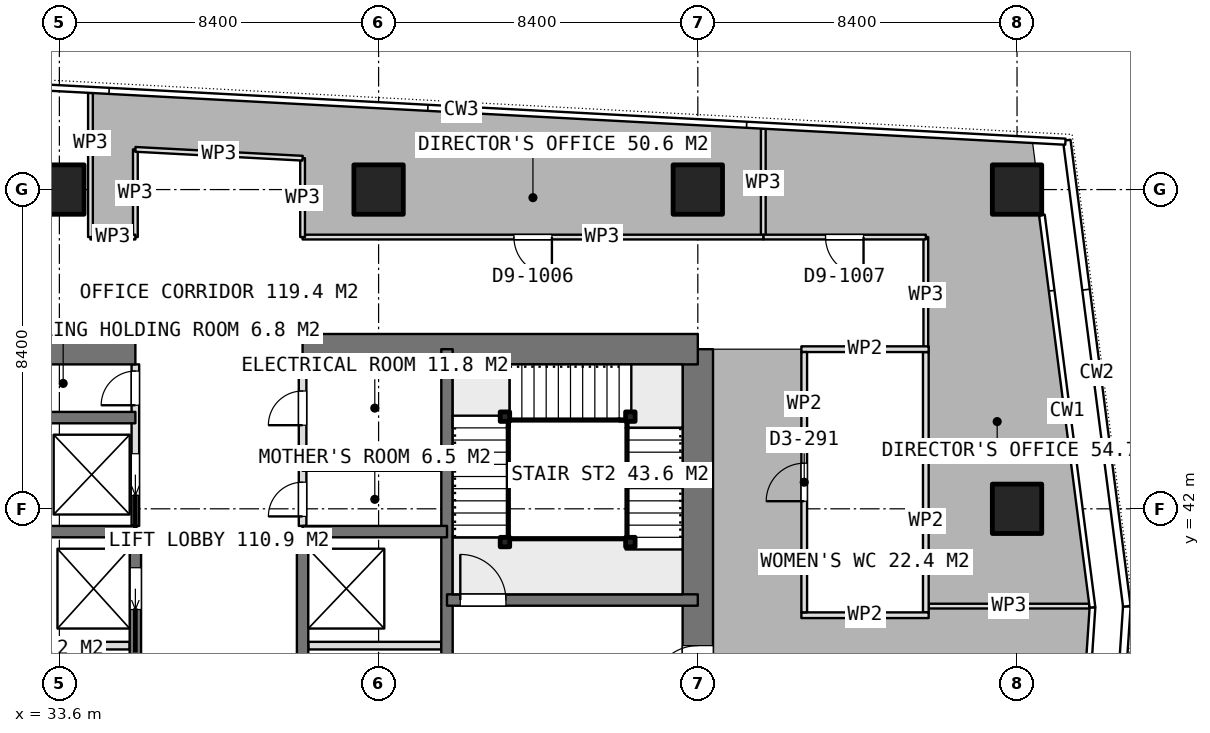
"""IFC4 building model, lengths in metres.
Left out: names, types, materials, properties, quantities, classifications, styles, units other than length and angle.
Written with IfcOpenShell. Run it as: python <this file> out.ifc"""

import sys

from ifc_helpers import new_model, si_unit, direction, frame, frame_2d, origin, origin_2d, place, context, subcontext, project, spatial, rectangle, extrude, element, fill, save


model = new_model("IFC4")
c1 = context("Model", 3, precision=1e-05, world=origin(), true_north=direction((0.0, 1.0)))
c2 = subcontext(c1, "Body", "Model", "MODEL_VIEW")
j1 = project(units=[si_unit("LENGTHUNIT", "METRE"), si_unit("PLANEANGLEUNIT", "RADIAN")], contexts=[c1])
p1 = place(None, origin())
s1 = spatial("IfcSite", under=j1, at=p1, CompositionType="ELEMENT")
p2 = place(p1, origin())
s2 = spatial("IfcBuilding", under=s1, at=p2, CompositionType="ELEMENT")
p3 = place(p2, frame((0.0, 0.0, 268.85)))
s3 = spatial("IfcBuildingStorey", under=s2, at=p3, CompositionType="ELEMENT", Elevation=268.85)
p4 = place(p3, frame((25.2, 46.2, 0.0), z_axis=(0.0, 0.0, 1.0), x_axis=(1.0, 0.0, 0.0)))
e1 = element("IfcWall", 1, at=p4, inside=s3, PredefinedType="SHEAR", context=c2, shape_type="SweptSolid", body=[
    extrude(rectangle(XDim=10.4, YDim=0.8, at=frame_2d((5.2, 0.0))), origin(), (0.0, 0.0, 1.0), 3.75),
])
p5 = place(p3, frame((40.0, 46.2, 0.0), z_axis=(0.0, 0.0, 1.0), x_axis=(1.0, 0.0, 0.0)))
e2 = element("IfcWall", 2, at=p5, inside=s3, PredefinedType="SHEAR", context=c2, shape_type="SweptSolid", body=[
    extrude(rectangle(XDim=10.4, YDim=0.8, at=frame_2d((5.2, 0.0))), origin(), (0.0, 0.0, 1.0), 3.75),
])
p6 = place(p3, frame((50.4, 21.0, 0.0), z_axis=(0.0, 0.0, 1.0), x_axis=(0.0, 1.0, 0.0)))
e3 = element("IfcWall", 3, at=p6, inside=s3, PredefinedType="SHEAR", context=c2, shape_type="SweptSolid", body=[
    extrude(rectangle(XDim=25.2, YDim=0.8, at=frame_2d((12.6, 0.0))), origin(), (0.0, 0.0, 1.0), 3.75),
])
p7 = place(p6, frame((16.2, 0.0, 0.0)))
e4 = element("IfcOpeningElement", 4, at=p7, cuts=e3, PredefinedType="OPENING", context=c2, shape_type="SweptSolid", body=[
    extrude(rectangle(XDim=1.2, YDim=2.1, at=frame_2d((0.6, 1.05))), frame((0.0, 0.41, 0.0), z_axis=(0.0, -1.0, 0.0), x_axis=(1.0, 0.0, 0.0)), (0.0, 0.0, 1.0), 0.82),
])
p8 = place(p6, frame((10.05, 0.0, 0.0)))
e5 = element("IfcOpeningElement", 5, at=p8, cuts=e3, PredefinedType="OPENING", context=c2, shape_type="SweptSolid", body=[
    extrude(rectangle(XDim=0.9, YDim=2.1, at=frame_2d((0.45, 1.05))), frame((0.0, 0.41, 0.0), z_axis=(0.0, -1.0, 0.0), x_axis=(1.0, 0.0, 0.0)), (0.0, 0.0, 1.0), 0.82),
])
p9 = place(p6, frame((7.45, 0.0, 0.0)))
e6 = element("IfcOpeningElement", 6, at=p9, cuts=e3, PredefinedType="OPENING", context=c2, shape_type="SweptSolid", body=[
    extrude(rectangle(XDim=0.9, YDim=2.1, at=frame_2d((0.45, 1.05))), frame((0.0, 0.41, 0.0), z_axis=(0.0, -1.0, 0.0), x_axis=(1.0, 0.0, 0.0)), (0.0, 0.0, 1.0), 0.82),
])
p10 = place(p6, frame((0.6, 0.0, 0.0)))
e7 = element("IfcOpeningElement", 7, at=p10, cuts=e3, PredefinedType="OPENING", context=c2, shape_type="SweptSolid", body=[
    extrude(rectangle(XDim=1.2, YDim=2.1, at=frame_2d((0.6, 1.05))), frame((0.0, 0.41, 0.0), z_axis=(0.0, -1.0, 0.0), x_axis=(1.0, 0.0, 0.0)), (0.0, 0.0, 1.0), 0.82),
])
p11 = place(p3, frame((43.8, 21.0, 0.0), z_axis=(0.0, 0.0, 1.0), x_axis=(0.0, 1.0, 0.0)))
e8 = element("IfcWall", 8, at=p11, inside=s3, PredefinedType="SHEAR", context=c2, shape_type="SweptSolid", body=[
    extrude(rectangle(XDim=25.2, YDim=0.3, at=frame_2d((12.6, 0.0))), origin(), (0.0, 0.0, 1.0), 3.75),
])
p12 = place(p3, frame((35.6, 23.4, 0.0), z_axis=(0.0, 0.0, 1.0), x_axis=(0.0, 1.0, 0.0)))
e9 = element("IfcWall", 9, at=p12, inside=s3, PredefinedType="SHEAR", context=c2, shape_type="SweptSolid", body=[
    extrude(rectangle(XDim=18.0, YDim=0.3, at=frame_2d((9.0, 0.0))), origin(), (0.0, 0.0, 1.0), 3.75),
])
p13 = place(p12, frame((0.95, 0.0, 0.0)))
e10 = element("IfcOpeningElement", 10, at=p13, cuts=e9, PredefinedType="OPENING", context=c2, shape_type="SweptSolid", body=[
    extrude(rectangle(XDim=1.1, YDim=2.1, at=frame_2d((0.55, 1.05))), frame((0.0, 0.16, 0.0), z_axis=(0.0, -1.0, 0.0), x_axis=(1.0, 0.0, 0.0)), (0.0, 0.0, 1.0), 0.32),
])
p14 = place(p12, frame((3.95, 0.0, 0.0)))
e11 = element("IfcOpeningElement", 11, at=p14, cuts=e9, PredefinedType="OPENING", context=c2, shape_type="SweptSolid", body=[
    extrude(rectangle(XDim=1.1, YDim=2.1, at=frame_2d((0.55, 1.05))), frame((0.0, 0.16, 0.0), z_axis=(0.0, -1.0, 0.0), x_axis=(1.0, 0.0, 0.0)), (0.0, 0.0, 1.0), 0.32),
])
p15 = place(p12, frame((6.95, 0.0, 0.0)))
e12 = element("IfcOpeningElement", 12, at=p15, cuts=e9, PredefinedType="OPENING", context=c2, shape_type="SweptSolid", body=[
    extrude(rectangle(XDim=1.1, YDim=2.1, at=frame_2d((0.55, 1.05))), frame((0.0, 0.16, 0.0), z_axis=(0.0, -1.0, 0.0), x_axis=(1.0, 0.0, 0.0)), (0.0, 0.0, 1.0), 0.32),
])
p16 = place(p12, frame((9.95, 0.0, 0.0)))
e13 = element("IfcOpeningElement", 13, at=p16, cuts=e9, PredefinedType="OPENING", context=c2, shape_type="SweptSolid", body=[
    extrude(rectangle(XDim=1.1, YDim=2.1, at=frame_2d((0.55, 1.05))), frame((0.0, 0.16, 0.0), z_axis=(0.0, -1.0, 0.0), x_axis=(1.0, 0.0, 0.0)), (0.0, 0.0, 1.0), 0.32),
])
p17 = place(p12, frame((12.95, 0.0, 0.0)))
e14 = element("IfcOpeningElement", 14, at=p17, cuts=e9, PredefinedType="OPENING", context=c2, shape_type="SweptSolid", body=[
    extrude(rectangle(XDim=1.1, YDim=2.1, at=frame_2d((0.55, 1.05))), frame((0.0, 0.16, 0.0), z_axis=(0.0, -1.0, 0.0), x_axis=(1.0, 0.0, 0.0)), (0.0, 0.0, 1.0), 0.32),
])
p18 = place(p12, frame((15.95, 0.0, 0.0)))
e15 = element("IfcOpeningElement", 15, at=p18, cuts=e9, PredefinedType="OPENING", context=c2, shape_type="SweptSolid", body=[
    extrude(rectangle(XDim=1.1, YDim=2.1, at=frame_2d((0.55, 1.05))), frame((0.0, 0.16, 0.0), z_axis=(0.0, -1.0, 0.0), x_axis=(1.0, 0.0, 0.0)), (0.0, 0.0, 1.0), 0.32),
])
p19 = place(p3, frame((40.0, 23.4, 0.0), z_axis=(0.0, 0.0, 1.0), x_axis=(0.0, 1.0, 0.0)))
e16 = element("IfcWall", 16, at=p19, inside=s3, PredefinedType="SHEAR", context=c2, shape_type="SweptSolid", body=[
    extrude(rectangle(XDim=18.0, YDim=0.3, at=frame_2d((9.0, 0.0))), origin(), (0.0, 0.0, 1.0), 3.75),
])
p20 = place(p19, frame((3.15, 0.0, 0.0)))
e17 = element("IfcOpeningElement", 17, at=p20, cuts=e16, PredefinedType="OPENING", context=c2, shape_type="SweptSolid", body=[
    extrude(rectangle(XDim=0.9, YDim=2.1, at=frame_2d((0.45, 1.05))), frame((0.0, 0.16, 0.0), z_axis=(0.0, -1.0, 0.0), x_axis=(1.0, 0.0, 0.0)), (0.0, 0.0, 1.0), 0.32),
])
p21 = place(p19, frame((9.1, 0.0, 0.0)))
e18 = element("IfcOpeningElement", 18, at=p21, cuts=e16, PredefinedType="OPENING", context=c2, shape_type="SweptSolid", body=[
    extrude(rectangle(XDim=1.0, YDim=2.1, at=frame_2d((0.5, 1.05))), frame((0.0, 0.16, 0.0), z_axis=(0.0, -1.0, 0.0), x_axis=(1.0, 0.0, 0.0)), (0.0, 0.0, 1.0), 0.32),
])
for number, where, z_axis, x_axis in (
    (19, (31.8, 41.4, 0.0), (0.0, 0.0, 1.0), (1.0, 0.0, 0.0)),
    (20, (31.8, 44.4, 0.0), (0.0, 0.0, 1.0), (1.0, 0.0, 0.0)),
    (21, (40.0, 41.4, 0.0), (0.0, 0.0, 1.0), (1.0, 0.0, 0.0)),
):
    element("IfcWall", number, at=place(p3, frame(where, z_axis=z_axis, x_axis=x_axis)), inside=s3, PredefinedType="SHEAR", context=c2, shape_type="SweptSolid", body=[
        extrude(rectangle(XDim=3.8, YDim=0.3, at=frame_2d((1.9, 0.0))), origin(), (0.0, 0.0, 1.0), 3.75),
    ])
p22 = place(p3, frame((43.8, 39.6, 0.0), z_axis=(0.0, 0.0, 1.0), x_axis=(1.0, 0.0, 0.0)))
e22 = element("IfcWall", 22, at=p22, inside=s3, PredefinedType="SHEAR", context=c2, shape_type="SweptSolid", body=[
    extrude(rectangle(XDim=6.6, YDim=0.3, at=frame_2d((3.3, 0.0))), origin(), (0.0, 0.0, 1.0), 3.75),
])
p23 = place(p22, frame((0.35, 0.0, 0.0)))
e23 = element("IfcOpeningElement", 23, at=p23, cuts=e22, PredefinedType="OPENING", context=c2, shape_type="SweptSolid", body=[
    extrude(rectangle(XDim=1.2, YDim=2.1, at=frame_2d((0.6, 1.05))), frame((0.0, 0.16, 0.0), z_axis=(0.0, -1.0, 0.0), x_axis=(1.0, 0.0, 0.0)), (0.0, 0.0, 1.0), 0.32),
])
for number, where, z_axis, x_axis in (
    (24, (33.6, 50.4, 0.0), (0.0, 0.0, 1.0), (1.0, 0.0, 0.0)),
    (25, (42.0, 50.4, 0.0), (0.0, 0.0, 1.0), (1.0, 0.0, 0.0)),
    (26, (50.4, 50.4, 0.0), (0.0, 0.0, 1.0), (1.0, 0.0, 0.0)),
    (27, (58.8, 42.0, 0.0), (0.0, 0.0, 1.0), (1.0, 0.0, 0.0)),
    (28, (58.8, 50.4, 0.0), (0.0, 0.0, 1.0), (1.0, 0.0, 0.0)),
):
    element("IfcColumn", number, at=place(p3, frame(where, z_axis=z_axis, x_axis=x_axis)), inside=s3, PredefinedType="COLUMN", context=c2, shape_type="SweptSolid", body=[
        extrude(rectangle(XDim=1.3, YDim=1.3, at=origin_2d()), origin(), (0.0, 0.0, 1.0), 3.75),
    ])
for number, where, z_axis, x_axis in (
    (29, (31.95, 38.4, 0.0), (0.0, 0.0, 1.0), (1.0, 0.0, 0.0)),
    (30, (40.15, 38.4, 0.0), (0.0, 0.0, 1.0), (1.0, 0.0, 0.0)),
):
    element("IfcWall", number, at=place(p3, frame(where, z_axis=z_axis, x_axis=x_axis)), inside=s3, PredefinedType="PARTITIONING", context=c2, shape_type="SweptSolid", body=[
        extrude(rectangle(XDim=3.5, YDim=0.2, at=frame_2d((1.75, 0.0))), origin(), (0.0, 0.0, 1.0), 3.5),
    ])
p24 = place(p3, frame((40.0, 41.55, 0.0), z_axis=(0.0, 0.0, 1.0), x_axis=(0.0, 1.0, 0.0)))
e31 = element("IfcWall", 31, at=p24, inside=s3, PredefinedType="PARTITIONING", context=c2, shape_type="SweptSolid", body=[
    extrude(rectangle(XDim=4.25, YDim=0.2, at=frame_2d((2.125, 0.0))), origin(), (0.0, 0.0, 1.0), 3.5),
])
p25 = place(p24, frame((2.65, 0.0, 0.0)))
e32 = element("IfcOpeningElement", 32, at=p25, cuts=e31, PredefinedType="OPENING", context=c2, shape_type="SweptSolid", body=[
    extrude(rectangle(XDim=0.9, YDim=2.1, at=frame_2d((0.45, 1.05))), frame((0.0, 0.11, 0.0), z_axis=(0.0, -1.0, 0.0), x_axis=(1.0, 0.0, 0.0)), (0.0, 0.0, 1.0), 0.22),
])
p26 = place(p24, frame((0.25, 0.0, 0.0)))
e33 = element("IfcOpeningElement", 33, at=p26, cuts=e31, PredefinedType="OPENING", context=c2, shape_type="SweptSolid", body=[
    extrude(rectangle(XDim=0.9, YDim=2.1, at=frame_2d((0.45, 1.05))), frame((0.0, 0.11, 0.0), z_axis=(0.0, -1.0, 0.0), x_axis=(1.0, 0.0, 0.0)), (0.0, 0.0, 1.0), 0.22),
])
p27 = place(p3, frame((35.6, 41.55, 0.0), z_axis=(0.0, 0.0, 1.0), x_axis=(0.0, 1.0, 0.0)))
e34 = element("IfcWall", 34, at=p27, inside=s3, PredefinedType="PARTITIONING", context=c2, shape_type="SweptSolid", body=[
    extrude(rectangle(XDim=4.25, YDim=0.2, at=frame_2d((2.125, 0.0))), origin(), (0.0, 0.0, 1.0), 3.5),
])
p28 = place(p27, frame((3.175, 0.0, 0.0)))
e35 = element("IfcOpeningElement", 35, at=p28, cuts=e34, PredefinedType="OPENING", context=c2, shape_type="SweptSolid", body=[
    extrude(rectangle(XDim=0.9, YDim=2.1, at=frame_2d((0.45, 1.05))), frame((0.0, 0.11, 0.0), z_axis=(0.0, -1.0, 0.0), x_axis=(1.0, 0.0, 0.0)), (0.0, 0.0, 1.0), 0.22),
])
p29 = place(p27, frame((0.8, 0.0, 0.0)))
e36 = element("IfcOpeningElement", 36, at=p29, cuts=e34, PredefinedType="OPENING", context=c2, shape_type="SweptSolid", body=[
    extrude(rectangle(XDim=1.1, YDim=2.1, at=frame_2d((0.55, 1.05))), frame((0.0, 0.11, 0.0), z_axis=(0.0, -1.0, 0.0), x_axis=(1.0, 0.0, 0.0)), (0.0, 0.0, 1.0), 0.22),
])
p30 = place(p3, frame((40.0, 43.1, 0.0), z_axis=(0.0, 0.0, 1.0), x_axis=(1.0, 0.0, 0.0)))
e37 = element("IfcWall", 37, at=p30, inside=s3, PredefinedType="PARTITIONING", context=c2, shape_type="SweptSolid", body=[
    extrude(rectangle(XDim=3.65, YDim=0.2, at=frame_2d((1.825, 0.0))), origin(), (0.0, 0.0, 1.0), 3.5),
])
for number, where, z_axis, x_axis in (
    (38, (53.125, 39.2, 0.0), (0.0, 0.0, 1.0), (1.0, 0.0, 0.0)),
    (39, (53.125, 46.2, 0.0), (0.0, 0.0, 1.0), (1.0, 0.0, 0.0)),
):
    element("IfcWall", number, at=place(p3, frame(where, z_axis=z_axis, x_axis=x_axis)), inside=s3, PredefinedType="PARTITIONING", context=c2, shape_type="SweptSolid", body=[
        extrude(rectangle(XDim=3.35, YDim=0.15, at=frame_2d((1.675, 0.0))), origin(), (0.0, 0.0, 1.0), 3.5),
    ])
p31 = place(p3, frame((53.2, 39.275, 0.0), z_axis=(0.0, 0.0, 1.0), x_axis=(0.0, 1.0, 0.0)))
e40 = element("IfcWall", 40, at=p31, inside=s3, PredefinedType="PARTITIONING", context=c2, shape_type="SweptSolid", body=[
    extrude(rectangle(XDim=6.85, YDim=0.15, at=frame_2d((3.425, 0.0))), origin(), (0.0, 0.0, 1.0), 3.5),
])
p32 = place(p31, frame((2.925, 0.0, 0.0)))
e41 = element("IfcOpeningElement", 41, at=p32, cuts=e40, PredefinedType="OPENING", context=c2, shape_type="SweptSolid", body=[
    extrude(rectangle(XDim=1.0, YDim=2.1, at=frame_2d((0.5, 1.05))), frame((0.0, 0.085, 0.0), z_axis=(0.0, -1.0, 0.0), x_axis=(1.0, 0.0, 0.0)), (0.0, 0.0, 1.0), 0.17),
])
p33 = place(p3, frame((56.4, 39.275, 0.0), z_axis=(0.0, 0.0, 1.0), x_axis=(0.0, 1.0, 0.0)))
e42 = element("IfcWall", 42, at=p33, inside=s3, PredefinedType="PARTITIONING", context=c2, shape_type="SweptSolid", body=[
    extrude(rectangle(XDim=6.85, YDim=0.15, at=frame_2d((3.425, 0.0))), origin(), (0.0, 0.0, 1.0), 3.5),
])
p34 = place(p3, frame((52.123, 49.15, 0.0), z_axis=(0.0, 0.0, 1.0), x_axis=(0.0, 1.0, 0.0)))
e43 = element("IfcWall", 43, at=p34, inside=s3, PredefinedType="PARTITIONING", context=c2, shape_type="SweptSolid", body=[
    extrude(rectangle(XDim=2.852, YDim=0.125, at=frame_2d((1.426, 0.0))), origin(), (0.0, 0.0, 1.0), 3.5),
])
p35 = place(p3, frame((60.7, 39.44, 0.0), z_axis=(0.0, 0.0, 1.0), x_axis=(-1.0, 0.0, 0.0)))
e44 = element("IfcWall", 44, at=p35, inside=s3, PredefinedType="PARTITIONING", context=c2, shape_type="SweptSolid", body=[
    extrude(rectangle(XDim=4.225, YDim=0.125, at=frame_2d((2.112, 0.0))), origin(), (0.0, 0.0, 1.0), 3.5),
])
p36 = place(p3, frame((56.4, 46.125, 0.0), z_axis=(0.0, 0.0, 1.0), x_axis=(0.0, 1.0, 0.0)))
e45 = element("IfcWall", 45, at=p36, inside=s3, PredefinedType="PARTITIONING", context=c2, shape_type="SweptSolid", body=[
    extrude(rectangle(XDim=3.025, YDim=0.125, at=frame_2d((1.512, 0.0))), origin(), (0.0, 0.0, 1.0), 3.5),
])
p37 = place(p3, frame((56.4, 49.15, 0.0), z_axis=(0.0, 0.0, 1.0), x_axis=(-1.0, 0.0, 0.0)))
e46 = element("IfcWall", 46, at=p37, inside=s3, PredefinedType="PARTITIONING", context=c2, shape_type="SweptSolid", body=[
    extrude(rectangle(XDim=4.277, YDim=0.125, at=frame_2d((2.138, 0.0))), origin(), (0.0, 0.0, 1.0), 3.5),
])
p38 = place(p37, frame((1.639, 0.0, 0.0)))
e47 = element("IfcOpeningElement", 47, at=p38, cuts=e46, PredefinedType="OPENING", context=c2, shape_type="SweptSolid", body=[
    extrude(rectangle(XDim=1.0, YDim=2.1, at=frame_2d((0.5, 1.05))), frame((0.0, 0.073, 0.0), z_axis=(0.0, -1.0, 0.0), x_axis=(1.0, 0.0, 0.0)), (0.0, 0.0, 1.0), 0.145),
])
p39 = place(p3, frame((35.6, 51.458, 0.0), z_axis=(0.0, 0.0, 1.0), x_axis=(0.0, -1.0, 0.0)))
e48 = element("IfcWall", 48, at=p39, inside=s3, PredefinedType="PARTITIONING", context=c2, shape_type="SweptSolid", body=[
    extrude(rectangle(XDim=2.308, YDim=0.125, at=frame_2d((1.154, 0.0))), origin(), (0.0, 0.0, 1.0), 3.5),
])
p40 = place(p3, frame((35.6, 49.15, 0.0), z_axis=(0.0, 0.0, 1.0), x_axis=(-1.0, 0.0, 0.0)))
e49 = element("IfcWall", 49, at=p40, inside=s3, PredefinedType="PARTITIONING", context=c2, shape_type="SweptSolid", body=[
    extrude(rectangle(XDim=1.182, YDim=0.125, at=frame_2d((0.591, 0.0))), origin(), (0.0, 0.0, 1.0), 3.5),
])
p41 = place(p3, frame((34.418, 49.15, 0.0), z_axis=(0.0, 0.0, 1.0), x_axis=(0.0, 1.0, 0.0)))
e50 = element("IfcWall", 50, at=p41, inside=s3, PredefinedType="PARTITIONING", context=c2, shape_type="SweptSolid", body=[
    extrude(rectangle(XDim=3.793, YDim=0.125, at=frame_2d((1.896, 0.0))), origin(), (0.0, 0.0, 1.0), 3.5),
])
p42 = place(p3, frame((52.123, 49.15, 0.0), z_axis=(0.0, 0.0, 1.0), x_axis=(-1.0, 0.0, 0.0)))
e51 = element("IfcWall", 51, at=p42, inside=s3, PredefinedType="PARTITIONING", context=c2, shape_type="SweptSolid", body=[
    extrude(rectangle(XDim=12.123, YDim=0.125, at=frame_2d((6.062, 0.0))), origin(), (0.0, 0.0, 1.0), 3.5),
])
p43 = place(p42, frame((5.562, 0.0, 0.0)))
e52 = element("IfcOpeningElement", 52, at=p43, cuts=e51, PredefinedType="OPENING", context=c2, shape_type="SweptSolid", body=[
    extrude(rectangle(XDim=1.0, YDim=2.1, at=frame_2d((0.5, 1.05))), frame((0.0, 0.073, 0.0), z_axis=(0.0, -1.0, 0.0), x_axis=(1.0, 0.0, 0.0)), (0.0, 0.0, 1.0), 0.145),
])
p44 = place(p3, frame((40.0, 49.15, 0.0), z_axis=(0.0, 0.0, 1.0), x_axis=(0.0, 1.0, 0.0)))
e53 = element("IfcWall", 53, at=p44, inside=s3, PredefinedType="PARTITIONING", context=c2, shape_type="SweptSolid", body=[
    extrude(rectangle(XDim=2.075, YDim=0.125, at=frame_2d((1.038, 0.0))), origin(), (0.0, 0.0, 1.0), 3.5),
])
p45 = place(p3, frame((40.0, 51.225, 0.0), z_axis=(0.0, 0.0, 1.0), x_axis=(-0.998601864588, 0.052861290579, 0.0)))
e54 = element("IfcWall", 54, at=p45, inside=s3, PredefinedType="PARTITIONING", context=c2, shape_type="SweptSolid", body=[
    extrude(rectangle(XDim=4.406, YDim=0.125, at=frame_2d((2.203, 0.0))), origin(), (0.0, 0.0, 1.0), 3.5),
])
for number, where, z_axis, x_axis in (
    (55, (45.325, 41.125, 0.0), (0.0, 0.0, 1.0), (1.0, 0.0, 0.0)),
    (56, (45.325, 44.425, 0.0), (0.0, 0.0, 1.0), (1.0, 0.0, 0.0)),
    (57, (48.625, 44.425, 0.0), (0.0, 0.0, 1.0), (1.0, 0.0, 0.0)),
    (58, (48.625, 41.125, 0.0), (0.0, 0.0, 1.0), (1.0, 0.0, 0.0)),
):
    element("IfcColumn", number, at=place(p3, frame(where, z_axis=z_axis, x_axis=x_axis)), inside=s3, PredefinedType="COLUMN", context=c2, shape_type="SweptSolid", body=[
        extrude(rectangle(XDim=0.25, YDim=0.25, at=origin_2d()), origin(), (0.0, 0.0, 1.0), 3.75),
    ])
p46 = place(p7, origin())
e59 = element("IfcDoor", 59, at=p46, inside=s3, OperationType="SINGLE_SWING_LEFT", PredefinedType="DOOR", context=c2, shape_type="SweptSolid", body=[
    extrude(rectangle(XDim=1.2, YDim=2.1, at=frame_2d((0.6, 1.05))), frame((0.0, 0.025, 0.0), z_axis=(0.0, -1.0, 0.0), x_axis=(1.0, 0.0, 0.0)), (0.0, 0.0, 1.0), 0.05),
])
fill(e4, e59)
p47 = place(p25, origin())
e60 = element("IfcDoor", 60, at=p47, inside=s3, OperationType="SINGLE_SWING_LEFT", PredefinedType="DOOR", context=c2, shape_type="SweptSolid", body=[
    extrude(rectangle(XDim=0.9, YDim=2.1, at=frame_2d((0.45, 1.05))), frame((0.0, 0.025, 0.0), z_axis=(0.0, -1.0, 0.0), x_axis=(1.0, 0.0, 0.0)), (0.0, 0.0, 1.0), 0.05),
])
fill(e32, e60)
p48 = place(p26, origin())
e61 = element("IfcDoor", 61, at=p48, inside=s3, OperationType="SINGLE_SWING_LEFT", PredefinedType="DOOR", context=c2, shape_type="SweptSolid", body=[
    extrude(rectangle(XDim=0.9, YDim=2.1, at=frame_2d((0.45, 1.05))), frame((0.0, 0.025, 0.0), z_axis=(0.0, -1.0, 0.0), x_axis=(1.0, 0.0, 0.0)), (0.0, 0.0, 1.0), 0.05),
])
fill(e33, e61)
p49 = place(p28, origin())
e62 = element("IfcDoor", 62, at=p49, inside=s3, OperationType="SINGLE_SWING_LEFT", PredefinedType="DOOR", context=c2, shape_type="SweptSolid", body=[
    extrude(rectangle(XDim=0.9, YDim=2.1, at=frame_2d((0.45, 1.05))), frame((0.0, 0.025, 0.0), z_axis=(0.0, -1.0, 0.0), x_axis=(1.0, 0.0, 0.0)), (0.0, 0.0, 1.0), 0.05),
])
fill(e35, e62)
p50 = place(p18, origin())
e63 = element("IfcDoor", 63, at=p50, inside=s3, OperationType="SLIDING_TO_LEFT", PredefinedType="USERDEFINED", context=c2, shape_type="SweptSolid", body=[
    extrude(rectangle(XDim=1.1, YDim=2.1, at=frame_2d((0.55, 1.05))), frame((0.0, 0.025, 0.0), z_axis=(0.0, -1.0, 0.0), x_axis=(1.0, 0.0, 0.0)), (0.0, 0.0, 1.0), 0.05),
])
fill(e15, e63)
p51 = place(p29, origin())
e64 = element("IfcDoor", 64, at=p51, inside=s3, OperationType="SLIDING_TO_LEFT", PredefinedType="USERDEFINED", context=c2, shape_type="SweptSolid", body=[
    extrude(rectangle(XDim=1.1, YDim=2.1, at=frame_2d((0.55, 1.05))), frame((0.0, 0.025, 0.0), z_axis=(0.0, -1.0, 0.0), x_axis=(1.0, 0.0, 0.0)), (0.0, 0.0, 1.0), 0.05),
])
fill(e36, e64)
p52 = place(p32, origin())
e65 = element("IfcDoor", 65, at=p52, inside=s3, OperationType="SINGLE_SWING_LEFT", PredefinedType="DOOR", context=c2, shape_type="SweptSolid", body=[
    extrude(rectangle(XDim=1.0, YDim=2.1, at=frame_2d((0.5, 1.05))), frame((0.0, 0.025, 0.0), z_axis=(0.0, -1.0, 0.0), x_axis=(1.0, 0.0, 0.0)), (0.0, 0.0, 1.0), 0.05),
])
fill(e41, e65)
p53 = place(p38, origin())
e66 = element("IfcDoor", 66, at=p53, inside=s3, OperationType="SINGLE_SWING_LEFT", PredefinedType="DOOR", context=c2, shape_type="SweptSolid", body=[
    extrude(rectangle(XDim=1.0, YDim=2.1, at=frame_2d((0.5, 1.05))), frame((0.0, 0.025, 0.0), z_axis=(0.0, -1.0, 0.0), x_axis=(1.0, 0.0, 0.0)), (0.0, 0.0, 1.0), 0.05),
])
fill(e47, e66)
p54 = place(p43, origin())
e67 = element("IfcDoor", 67, at=p54, inside=s3, OperationType="SINGLE_SWING_LEFT", PredefinedType="DOOR", context=c2, shape_type="SweptSolid", body=[
    extrude(rectangle(XDim=1.0, YDim=2.1, at=frame_2d((0.5, 1.05))), frame((0.0, 0.025, 0.0), z_axis=(0.0, -1.0, 0.0), x_axis=(1.0, 0.0, 0.0)), (0.0, 0.0, 1.0), 0.05),
])
fill(e52, e67)
p55 = place(p23, origin())
e68 = element("IfcDoor", 68, at=p55, inside=s3, OperationType="SINGLE_SWING_RIGHT", PredefinedType="DOOR", context=c2, shape_type="SweptSolid", body=[
    extrude(rectangle(XDim=1.2, YDim=2.1, at=frame_2d((0.6, 1.05))), frame((0.0, 0.025, 0.0), z_axis=(0.0, -1.0, 0.0), x_axis=(1.0, 0.0, 0.0)), (0.0, 0.0, 1.0), 0.05),
])
fill(e23, e68)
save(model, sys.argv[1])
